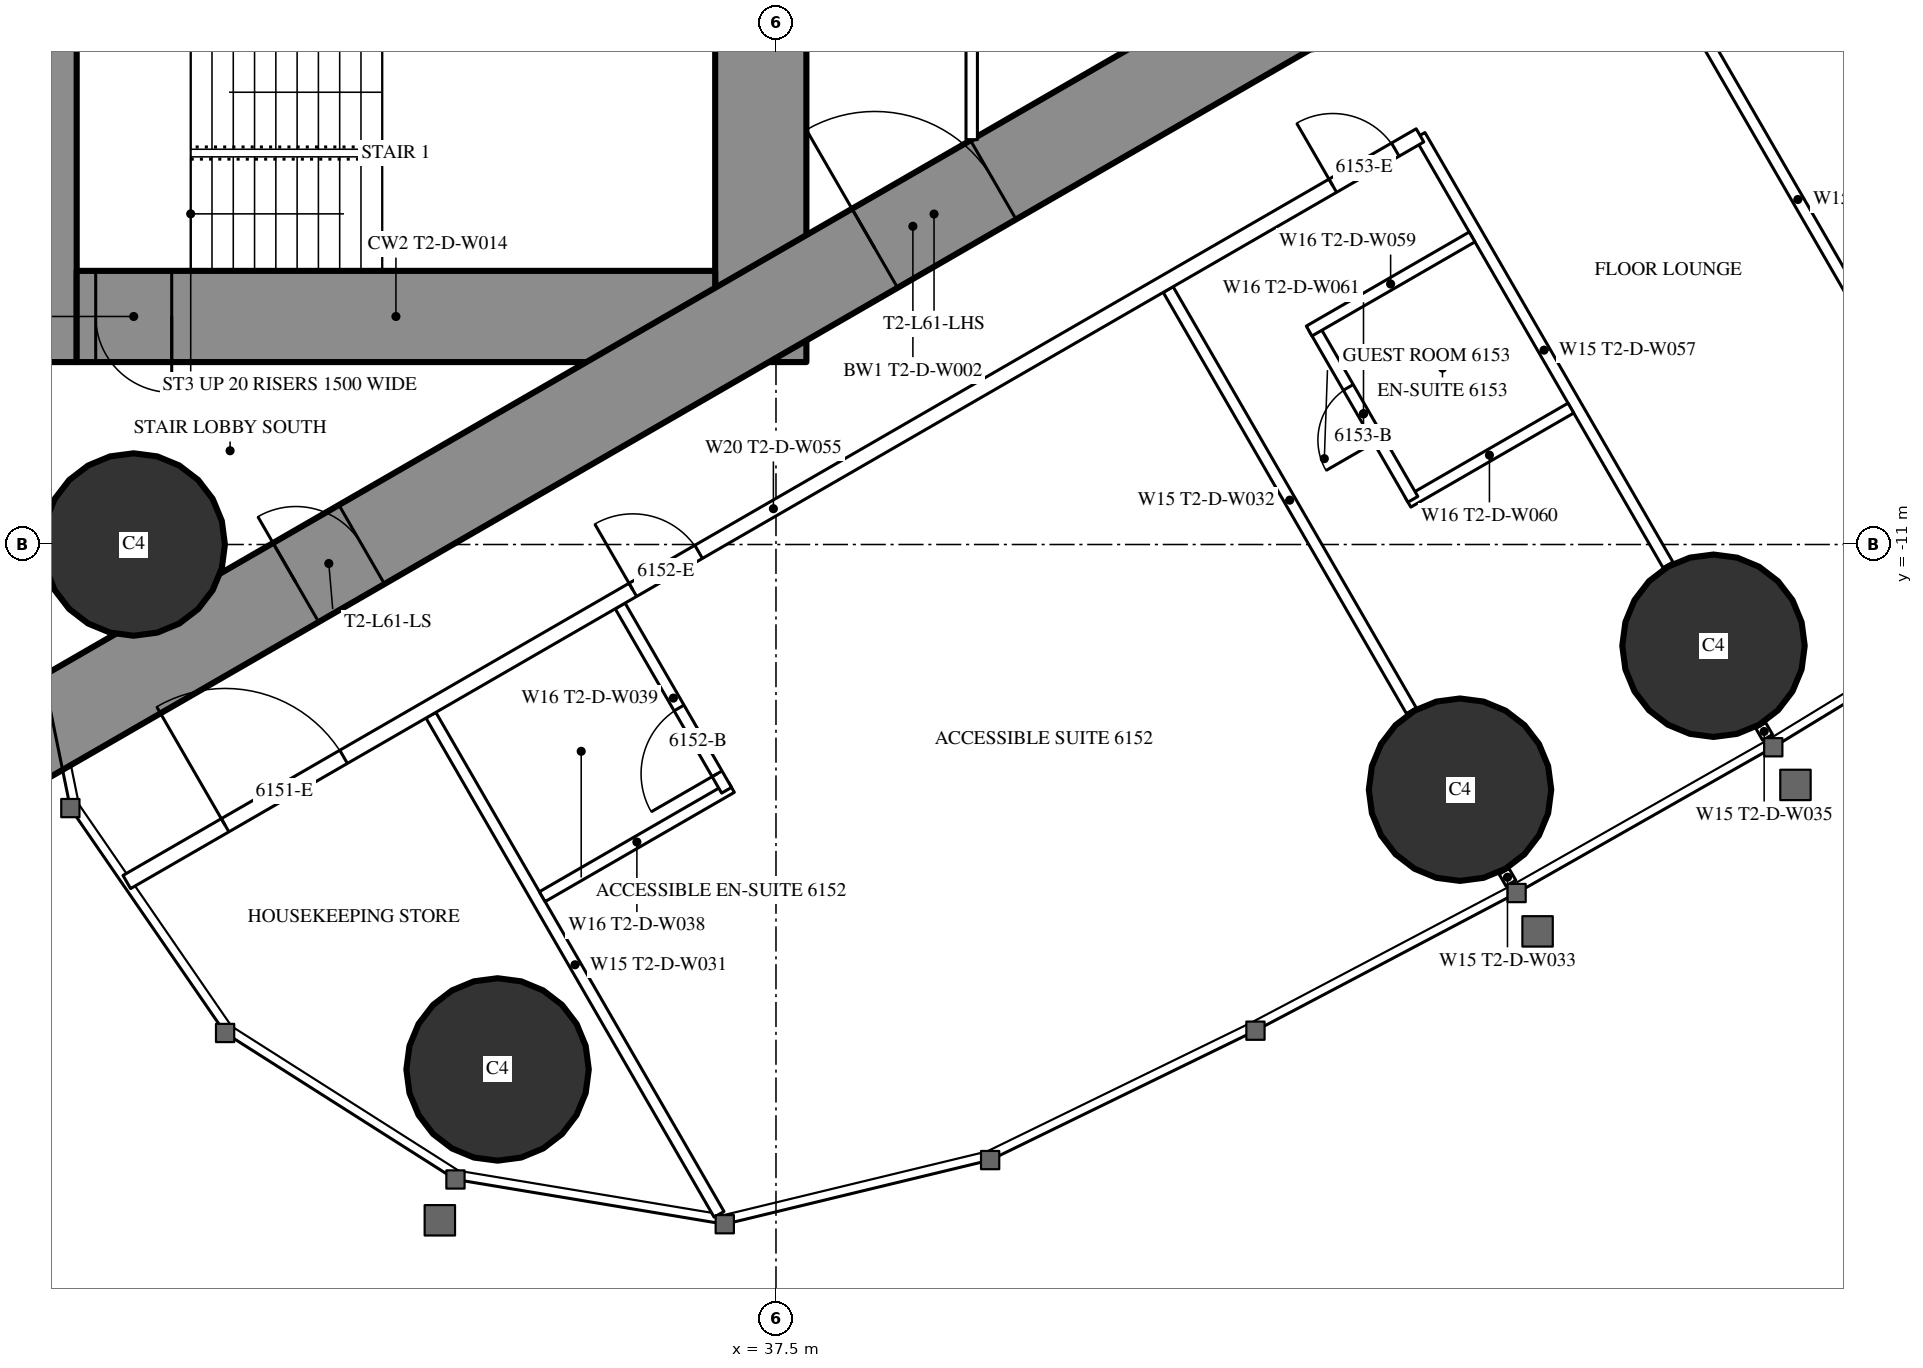
"""IFC4 building model, lengths in metres.
Left out: names, types, materials, properties, quantities, classifications, styles, units other than length and angle.
Written with IfcOpenShell. Run it as: python <this file> out.ifc"""

import sys

from ifc_helpers import new_model, si_unit, direction, frame, frame_2d, origin, origin_2d, place, context, subcontext, project, spatial, rectangle, circle, extrude, element, fill, save


model = new_model("IFC4")
c1 = context("Model", 3, precision=1e-05, world=origin(), true_north=direction((0.0, 1.0)))
c2 = subcontext(c1, "Body", "Model", "MODEL_VIEW")
j1 = project(units=[si_unit("LENGTHUNIT", "METRE"), si_unit("PLANEANGLEUNIT", "RADIAN")], contexts=[c1])
p1 = place(None, origin())
s1 = spatial("IfcSite", under=j1, at=p1, CompositionType="ELEMENT")
p2 = place(p1, origin())
s2 = spatial("IfcBuilding", under=s1, at=p2, CompositionType="ELEMENT")
p3 = place(p2, frame((0.0, 0.0, 229.7)))
s3 = spatial("IfcBuildingStorey", under=s2, at=p3, CompositionType="ELEMENT", Elevation=229.7)
for number, where, z_axis, x_axis in (
    (1, (33.837, -17.906, 0.0), (0.0, 0.0, 1.0), (1.0, 0.0, 0.0)),
    (2, (29.05, -11.0, 0.0), (0.0, 0.0, 1.0), (1.0, 0.0, 0.0)),
    (3, (46.499, -14.226, 0.0), (0.0, 0.0, 1.0), (1.0, 0.0, 0.0)),
    (4, (49.834, -12.332, 0.0), (0.0, 0.0, 1.0), (1.0, 0.0, 0.0)),
):
    element("IfcColumn", number, at=place(p3, frame(where, z_axis=z_axis, x_axis=x_axis)), inside=s3, PredefinedType="COLUMN", context=c2, shape_type="SweptSolid", body=[
        extrude(circle(Radius=1.2, at=origin_2d()), origin(), (0.0, 0.0, 1.0), 3.6),
    ])
p4 = place(p3, frame((27.9, -8.6, 0.0), z_axis=(0.0, 0.0, 1.0), x_axis=(0.0, 1.0, 0.0)))
e5 = element("IfcWall", 5, at=p4, inside=s3, PredefinedType="SHEAR", context=c2, shape_type="SweptSolid", body=[
    extrude(rectangle(XDim=17.2, YDim=0.8, at=frame_2d((8.6, 0.0))), origin(), (0.0, 0.0, 1.0), 3.6),
])
p5 = place(p4, frame((9.35, 0.0, 0.0)))
e6 = element("IfcOpeningElement", 6, at=p5, cuts=e5, PredefinedType="OPENING", context=c2, shape_type="SweptSolid", body=[
    extrude(rectangle(XDim=0.9, YDim=2.2, at=frame_2d((0.45, 1.1))), frame((0.0, 0.41, 0.0), z_axis=(0.0, -1.0, 0.0), x_axis=(1.0, 0.0, 0.0)), (0.0, 0.0, 1.0), 0.82),
])
p6 = place(p3, frame((37.3, -8.6, 0.0), z_axis=(0.0, 0.0, 1.0), x_axis=(0.0, 1.0, 0.0)))
e7 = element("IfcWall", 7, at=p6, inside=s3, PredefinedType="SHEAR", context=c2, shape_type="SweptSolid", body=[
    extrude(rectangle(XDim=17.2, YDim=1.2, at=frame_2d((8.6, 0.0))), origin(), (0.0, 0.0, 1.0), 3.6),
])
p7 = place(p6, frame((7.7, 0.0, 0.0)))
e8 = element("IfcOpeningElement", 8, at=p7, cuts=e7, PredefinedType="OPENING", context=c2, shape_type="SweptSolid", body=[
    extrude(rectangle(XDim=1.8, YDim=2.2, at=frame_2d((0.9, 1.1))), frame((0.0, 0.61, 0.0), z_axis=(0.0, -1.0, 0.0), x_axis=(1.0, 0.0, 0.0)), (0.0, 0.0, 1.0), 1.22),
])
p8 = place(p3, frame((28.3, -8.0, 0.0), z_axis=(0.0, 0.0, 1.0), x_axis=(1.0, 0.0, 0.0)))
e9 = element("IfcWall", 9, at=p8, inside=s3, PredefinedType="SHEAR", context=c2, shape_type="SweptSolid", body=[
    extrude(rectangle(XDim=8.4, YDim=1.2, at=frame_2d((4.2, 0.0))), origin(), (0.0, 0.0, 1.0), 3.6),
])
p9 = place(p8, frame((0.25, 0.0, 0.0)))
e10 = element("IfcOpeningElement", 10, at=p9, cuts=e9, PredefinedType="OPENING", context=c2, shape_type="SweptSolid", body=[
    extrude(rectangle(XDim=1.0, YDim=2.2, at=frame_2d((0.5, 1.1))), frame((0.0, 0.61, 0.0), z_axis=(0.0, -1.0, 0.0), x_axis=(1.0, 0.0, 0.0)), (0.0, 0.0, 1.0), 1.22),
])
p10 = place(p3, frame((27.2, -13.8, 0.0), z_axis=(0.0, 0.0, 1.0), x_axis=(0.866027159892, 0.499996958321, 0.0)))
e11 = element("IfcWall", 11, at=p10, inside=s3, PredefinedType="SHEAR", context=c2, shape_type="SweptSolid", body=[
    extrude(rectangle(XDim=27.947, YDim=1.2, at=frame_2d((13.973, 0.0))), origin(), (0.0, 0.0, 1.0), 3.6),
])
p11 = place(p10, frame((4.6, 0.0, 0.0)))
e12 = element("IfcOpeningElement", 12, at=p11, cuts=e11, PredefinedType="OPENING", context=c2, shape_type="SweptSolid", body=[
    extrude(rectangle(XDim=1.0, YDim=2.2, at=frame_2d((0.5, 1.1))), frame((0.0, 0.61, 0.0), z_axis=(0.0, -1.0, 0.0), x_axis=(1.0, 0.0, 0.0)), (0.0, 0.0, 1.0), 1.22),
])
p12 = place(p10, frame((13.395, 0.0, 0.0)))
e13 = element("IfcOpeningElement", 13, at=p12, cuts=e11, PredefinedType="OPENING", context=c2, shape_type="SweptSolid", body=[
    extrude(rectangle(XDim=1.8, YDim=2.2, at=frame_2d((0.9, 1.1))), frame((0.0, 0.61, 0.0), z_axis=(0.0, -1.0, 0.0), x_axis=(1.0, 0.0, 0.0)), (0.0, 0.0, 1.0), 1.22),
])
p13 = place(p3, frame((32.96, -13.246, 0.0), z_axis=(0.0, 0.0, 1.0), x_axis=(0.500000236886, -0.866025267018, 0.0)))
e14 = element("IfcWall", 14, at=p13, inside=s3, PredefinedType="PARTITIONING", context=c2, shape_type="SweptSolid", body=[
    extrude(rectangle(XDim=7.583, YDim=0.15, at=frame_2d((3.791, 0.0))), origin(), (0.0, 0.0, 1.0), 3.35),
])
p14 = place(p3, frame((42.66, -7.646, 0.0), z_axis=(0.0, 0.0, 1.0), x_axis=(0.499996592859, -0.866027370889, 0.0)))
e15 = element("IfcWall", 15, at=p14, inside=s3, PredefinedType="PARTITIONING", context=c2, shape_type="SweptSolid", body=[
    extrude(rectangle(XDim=6.398, YDim=0.15, at=frame_2d((3.199, 0.0))), origin(), (0.0, 0.0, 1.0), 2.45),
])
p15 = place(p3, frame((47.079, -15.3, 0.0), z_axis=(0.0, 0.0, 1.0), x_axis=(0.499212083968, -0.866479829667, 0.0)))
e16 = element("IfcWall", 16, at=p15, inside=s3, PredefinedType="PARTITIONING", context=c2, shape_type="SweptSolid", body=[
    extrude(rectangle(XDim=0.179, YDim=0.15, at=frame_2d((0.09, 0.0))), origin(), (0.0, 0.0, 1.0), 2.45),
])
p16 = place(p3, frame((45.973, -5.617, 0.0), z_axis=(0.0, 0.0, 1.0), x_axis=(0.499985856986, -0.866033569104, 0.0)))
e17 = element("IfcWall", 17, at=p16, inside=s3, PredefinedType="PARTITIONING", context=c2, shape_type="SweptSolid", body=[
    extrude(rectangle(XDim=6.526, YDim=0.15, at=frame_2d((3.263, 0.0))), origin(), (0.0, 0.0, 1.0), 2.45),
])
p17 = place(p3, frame((50.456, -13.382, 0.0), z_axis=(0.0, 0.0, 1.0), x_axis=(0.500661834965, -0.865642955848, 0.0)))
e18 = element("IfcWall", 18, at=p17, inside=s3, PredefinedType="PARTITIONING", context=c2, shape_type="SweptSolid", body=[
    extrude(rectangle(XDim=0.18, YDim=0.15, at=frame_2d((0.09, 0.0))), origin(), (0.0, 0.0, 1.0), 2.45),
])
p18 = place(p3, frame((49.335, -3.676, 0.0), z_axis=(0.0, 0.0, 1.0), x_axis=(0.500000613642, -0.866025049498, 0.0)))
e19 = element("IfcWall", 19, at=p18, inside=s3, PredefinedType="PARTITIONING", context=c2, shape_type="SweptSolid", body=[
    extrude(rectangle(XDim=6.433, YDim=0.15, at=frame_2d((3.216, 0.0))), origin(), (0.0, 0.0, 1.0), 2.45),
])
p19 = place(p3, frame((34.425, -15.633, 0.0), z_axis=(0.0, 0.0, 1.0), x_axis=(0.866018712932, 0.500011588718, 0.0)))
e20 = element("IfcWall", 20, at=p19, inside=s3, PredefinedType="PARTITIONING", context=c2, shape_type="SweptSolid", body=[
    extrude(rectangle(XDim=2.875, YDim=0.15, at=frame_2d((1.438, 0.0))), origin(), (0.0, 0.0, 1.0), 3.35),
])
p20 = place(p3, frame((35.45, -11.808, 0.0), z_axis=(0.0, 0.0, 1.0), x_axis=(0.49994636267, -0.866056369097, 0.0)))
e21 = element("IfcWall", 21, at=p20, inside=s3, PredefinedType="PARTITIONING", context=c2, shape_type="SweptSolid", body=[
    extrude(rectangle(XDim=2.8, YDim=0.15, at=frame_2d((1.4, 0.0))), origin(), (0.0, 0.0, 1.0), 3.35),
])
p21 = place(p20, frame((1.55, 0.0, 0.0)))
e22 = element("IfcOpeningElement", 22, at=p21, cuts=e21, PredefinedType="OPENING", context=c2, shape_type="SweptSolid", body=[
    extrude(rectangle(XDim=1.0, YDim=2.2, at=frame_2d((0.5, 1.1))), frame((0.0, 0.085, 0.0), z_axis=(0.0, -1.0, 0.0), x_axis=(1.0, 0.0, 0.0)), (0.0, 0.0, 1.0), 0.17),
])
p22 = place(p3, frame((45.814, -10.443, 0.0), z_axis=(0.0, 0.0, 1.0), x_axis=(0.866073894602, 0.499916002032, 0.0)))
e23 = element("IfcWall", 23, at=p22, inside=s3, PredefinedType="PARTITIONING", context=c2, shape_type="SweptSolid", body=[
    extrude(rectangle(XDim=2.475, YDim=0.15, at=frame_2d((1.238, 0.0))), origin(), (0.0, 0.0, 1.0), 3.35),
])
p23 = place(p3, frame((44.579, -8.154, 0.0), z_axis=(0.0, 0.0, 1.0), x_axis=(0.500006934395, -0.866021400173, 0.0)))
e24 = element("IfcWall", 24, at=p23, inside=s3, PredefinedType="PARTITIONING", context=c2, shape_type="SweptSolid", body=[
    extrude(rectangle(XDim=2.6, YDim=0.15, at=frame_2d((1.3, 0.0))), origin(), (0.0, 0.0, 1.0), 3.35),
])
p24 = place(p23, frame((0.9, 0.0, 0.0)))
e25 = element("IfcOpeningElement", 25, at=p24, cuts=e24, PredefinedType="OPENING", context=c2, shape_type="SweptSolid", body=[
    extrude(rectangle(XDim=0.8, YDim=2.2, at=frame_2d((0.4, 1.1))), frame((0.0, 0.085, 0.0), z_axis=(0.0, -1.0, 0.0), x_axis=(1.0, 0.0, 0.0)), (0.0, 0.0, 1.0), 0.17),
])
p25 = place(p3, frame((44.514, -8.191, 0.0), z_axis=(0.0, 0.0, 1.0), x_axis=(0.866031185235, 0.4999899861, 0.0)))
e26 = element("IfcWall", 26, at=p25, inside=s3, PredefinedType="PARTITIONING", context=c2, shape_type="SweptSolid", body=[
    extrude(rectangle(XDim=2.475, YDim=0.15, at=frame_2d((1.238, 0.0))), origin(), (0.0, 0.0, 1.0), 3.35),
])
p26 = place(p3, frame((28.959, -15.44, 0.0), z_axis=(0.0, 0.0, 1.0), x_axis=(0.866025204199, 0.500000345692, 0.0)))
e27 = element("IfcWall", 27, at=p26, inside=s3, PredefinedType="PARTITIONING", context=c2, shape_type="SweptSolid", body=[
    extrude(rectangle(XDim=19.646, YDim=0.2, at=frame_2d((9.823, 0.0))), origin(), (0.0, 0.0, 1.0), 3.35),
])
p27 = place(p26, frame((1.494, 0.0, 0.0)))
e28 = element("IfcOpeningElement", 28, at=p27, cuts=e27, PredefinedType="OPENING", context=c2, shape_type="SweptSolid", body=[
    extrude(rectangle(XDim=1.8, YDim=2.04, at=frame_2d((0.9, 1.02))), frame((0.0, 0.11, 0.0), z_axis=(0.0, -1.0, 0.0), x_axis=(1.0, 0.0, 0.0)), (0.0, 0.0, 1.0), 0.22),
])
p28 = place(p26, frame((7.687, 0.0, 0.0)))
e29 = element("IfcOpeningElement", 29, at=p28, cuts=e27, PredefinedType="OPENING", context=c2, shape_type="SweptSolid", body=[
    extrude(rectangle(XDim=1.0, YDim=2.2, at=frame_2d((0.5, 1.1))), frame((0.0, 0.11, 0.0), z_axis=(0.0, -1.0, 0.0), x_axis=(1.0, 0.0, 0.0)), (0.0, 0.0, 1.0), 0.22),
])
p29 = place(p26, frame((18.321, 0.0, 0.0)))
e30 = element("IfcOpeningElement", 30, at=p29, cuts=e27, PredefinedType="OPENING", context=c2, shape_type="SweptSolid", body=[
    extrude(rectangle(XDim=0.95, YDim=2.2, at=frame_2d((0.475, 1.1))), frame((0.0, 0.11, 0.0), z_axis=(0.0, -1.0, 0.0), x_axis=(1.0, 0.0, 0.0)), (0.0, 0.0, 1.0), 0.22),
])
p30 = place(p3, frame((40.075, -5.674, 0.0), z_axis=(0.0, 0.0, 1.0), x_axis=(0.0, 1.0, 0.0)))
e31 = element("IfcWall", 31, at=p30, inside=s3, PredefinedType="PARTITIONING", context=c2, shape_type="SweptSolid", body=[
    extrude(rectangle(XDim=11.348, YDim=0.15, at=frame_2d((5.674, 0.0))), origin(), (0.0, 0.0, 1.0), 3.35),
])
p31 = place(p30, frame((4.774, 0.0, 0.0)))
e32 = element("IfcOpeningElement", 32, at=p31, cuts=e31, PredefinedType="OPENING", context=c2, shape_type="SweptSolid", body=[
    extrude(rectangle(XDim=1.8, YDim=2.2, at=frame_2d((0.9, 1.1))), frame((0.0, 0.085, 0.0), z_axis=(0.0, -1.0, 0.0), x_axis=(1.0, 0.0, 0.0)), (0.0, 0.0, 1.0), 0.17),
])
p32 = place(p27, origin())
e33 = element("IfcDoor", 33, at=p32, inside=s3, OperationType="DOUBLE_DOOR_SINGLE_SWING", PredefinedType="DOOR", context=c2, shape_type="SweptSolid", body=[
    extrude(rectangle(XDim=1.8, YDim=2.04, at=frame_2d((0.9, 1.02))), frame((0.0, 0.025, 0.0), z_axis=(0.0, -1.0, 0.0), x_axis=(1.0, 0.0, 0.0)), (0.0, 0.0, 1.0), 0.05),
])
fill(e28, e33)
p33 = place(p21, origin())
e34 = element("IfcDoor", 34, at=p33, inside=s3, OperationType="SINGLE_SWING_RIGHT", PredefinedType="DOOR", context=c2, shape_type="SweptSolid", body=[
    extrude(rectangle(XDim=1.0, YDim=2.2, at=frame_2d((0.5, 1.1))), frame((0.0, 0.025, 0.0), z_axis=(0.0, -1.0, 0.0), x_axis=(1.0, 0.0, 0.0)), (0.0, 0.0, 1.0), 0.05),
])
fill(e22, e34)
p34 = place(p28, origin())
e35 = element("IfcDoor", 35, at=p34, inside=s3, OperationType="SINGLE_SWING_LEFT", PredefinedType="DOOR", context=c2, shape_type="SweptSolid", body=[
    extrude(rectangle(XDim=1.0, YDim=2.2, at=frame_2d((0.5, 1.1))), frame((0.0, 0.025, 0.0), z_axis=(0.0, -1.0, 0.0), x_axis=(1.0, 0.0, 0.0)), (0.0, 0.0, 1.0), 0.05),
])
fill(e29, e35)
p35 = place(p24, origin())
e36 = element("IfcDoor", 36, at=p35, inside=s3, OperationType="SINGLE_SWING_RIGHT", PredefinedType="DOOR", context=c2, shape_type="SweptSolid", body=[
    extrude(rectangle(XDim=0.8, YDim=2.2, at=frame_2d((0.4, 1.1))), frame((0.0, 0.025, 0.0), z_axis=(0.0, -1.0, 0.0), x_axis=(1.0, 0.0, 0.0)), (0.0, 0.0, 1.0), 0.05),
])
fill(e25, e36)
p36 = place(p29, origin())
e37 = element("IfcDoor", 37, at=p36, inside=s3, OperationType="SINGLE_SWING_LEFT", PredefinedType="DOOR", context=c2, shape_type="SweptSolid", body=[
    extrude(rectangle(XDim=0.95, YDim=2.2, at=frame_2d((0.475, 1.1))), frame((0.0, 0.025, 0.0), z_axis=(0.0, -1.0, 0.0), x_axis=(1.0, 0.0, 0.0)), (0.0, 0.0, 1.0), 0.05),
])
fill(e30, e37)
p37 = place(p11, origin())
e38 = element("IfcDoor", 38, at=p37, inside=s3, OperationType="SINGLE_SWING_LEFT", PredefinedType="DOOR", context=c2, shape_type="SweptSolid", body=[
    extrude(rectangle(XDim=1.0, YDim=2.2, at=frame_2d((0.5, 1.1))), frame((0.0, 0.025, 0.0), z_axis=(0.0, -1.0, 0.0), x_axis=(1.0, 0.0, 0.0)), (0.0, 0.0, 1.0), 0.05),
])
fill(e12, e38)
p38 = place(p12, origin())
e39 = element("IfcDoor", 39, at=p38, inside=s3, OperationType="DOUBLE_DOOR_SINGLE_SWING", PredefinedType="DOOR", context=c2, shape_type="SweptSolid", body=[
    extrude(rectangle(XDim=1.8, YDim=2.2, at=frame_2d((0.9, 1.1))), frame((0.0, 0.025, 0.0), z_axis=(0.0, -1.0, 0.0), x_axis=(1.0, 0.0, 0.0)), (0.0, 0.0, 1.0), 0.05),
])
fill(e13, e39)
p39 = place(p9, origin())
e40 = element("IfcDoor", 40, at=p39, inside=s3, OperationType="SINGLE_SWING_RIGHT", PredefinedType="DOOR", context=c2, shape_type="SweptSolid", body=[
    extrude(rectangle(XDim=1.0, YDim=2.2, at=frame_2d((0.5, 1.1))), frame((0.0, 0.025, 0.0), z_axis=(0.0, -1.0, 0.0), x_axis=(1.0, 0.0, 0.0)), (0.0, 0.0, 1.0), 0.05),
])
fill(e10, e40)
save(model, sys.argv[1])
